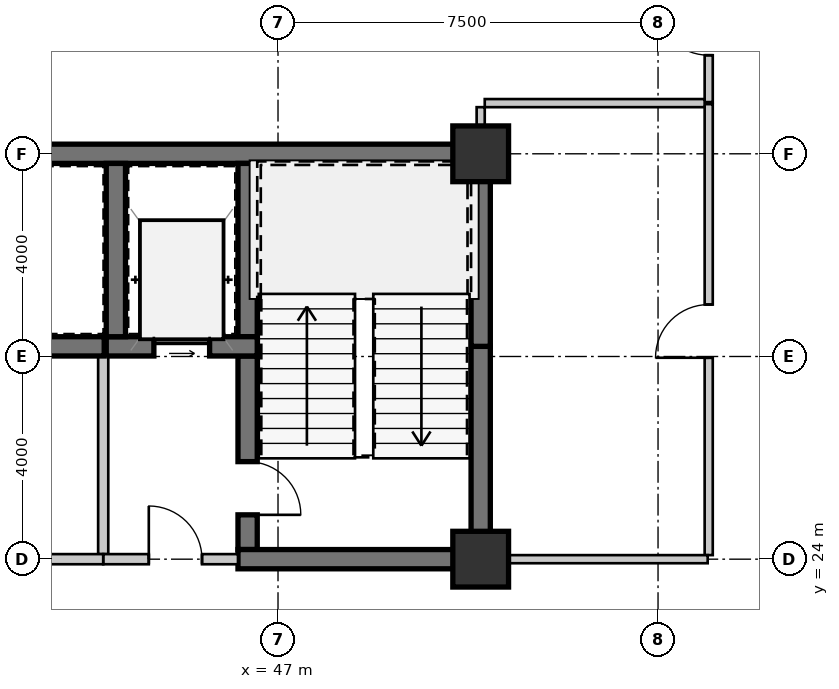
"""IFC4 building model, lengths in metres.
Left out: names, types, materials, properties, quantities, classifications, styles, units other than length and angle.
Written with IfcOpenShell. Run it as: python <this file> out.ifc"""

import sys

from ifc_helpers import new_model, si_unit, direction, frame, frame_2d, origin, origin_2d, place, context, subcontext, project, spatial, rectangle, extrude, source, transform, mapped, element, fill, save


model = new_model("IFC4")
c1 = context("Model", 3, precision=1e-05, world=origin(), true_north=direction((0.0, 1.0)))
c2 = subcontext(c1, "Body", "Model", "MODEL_VIEW")
j1 = project(units=[si_unit("LENGTHUNIT", "METRE"), si_unit("PLANEANGLEUNIT", "RADIAN")], contexts=[c1])
p1 = place(None, origin())
s1 = spatial("IfcSite", under=j1, at=p1, CompositionType="ELEMENT")
p2 = place(p1, origin())
s2 = spatial("IfcBuilding", under=s1, at=p2, CompositionType="ELEMENT")
p3 = place(p2, frame((0.0, 0.0, 4.55)))
s3 = spatial("IfcBuildingStorey", under=s2, at=p3, CompositionType="ELEMENT", Elevation=4.55)
m1 = source(origin(), c2, "Body", "SweptSolid", [
    extrude(rectangle(XDim=1.1, YDim=1.1, at=origin_2d()), origin(), (0.0, 0.0, 1.0), 3.85),
])
for number, where, z_axis, x_axis in (
    (1, (51.0, 24.0, 0.0), (0.0, 0.0, 1.0), (1.0, 0.0, 0.0)),
    (2, (51.0, 32.0, 0.0), (0.0, 0.0, 1.0), (1.0, 0.0, 0.0)),
):
    element("IfcColumn", number, at=place(p3, frame(where, z_axis=z_axis, x_axis=x_axis)), inside=s3, PredefinedType="COLUMN", context=c2, shape_type="MappedRepresentation", body=[
        mapped(m1, transform((0.0, 0.0, 0.0), scale=1.0)),
    ])
m2 = source(origin(), c2, "Body", "SweptSolid", [
    extrude(rectangle(XDim=11.99, YDim=0.38, at=frame_2d((5.995, 0.0))), origin(), (0.0, 0.0, 1.0), 3.59),
])
p4 = place(p3, frame((39.2, 32.0, 0.0), z_axis=(0.0, 0.0, 1.0), x_axis=(1.0, 0.0, 0.0)))
e3 = element("IfcWall", 3, at=p4, inside=s3, PredefinedType="SHEAR", context=c2, shape_type="MappedRepresentation", body=[
    mapped(m2, transform((0.0, 0.0, 0.0), scale=1.0)),
])
m3 = source(origin(), c2, "Body", "SweptSolid", [
    extrude(rectangle(XDim=4.01, YDim=0.38, at=frame_2d((2.005, 0.0))), origin(), (0.0, 0.0, 1.0), 3.59),
])
p5 = place(p3, frame((51.0, 24.19, 0.0), z_axis=(0.0, 0.0, 1.0), x_axis=(0.0, 1.0, 0.0)))
e4 = element("IfcWall", 4, at=p5, inside=s3, PredefinedType="SHEAR", context=c2, shape_type="MappedRepresentation", body=[
    mapped(m3, transform((0.0, 0.0, 0.0), scale=1.0)),
])
m4 = source(origin(), c2, "Body", "SweptSolid", [
    extrude(rectangle(XDim=3.61, YDim=0.38, at=frame_2d((1.805, 0.0))), origin(), (0.0, 0.0, 1.0), 3.59),
])
p6 = place(p3, frame((51.0, 28.2, 0.0), z_axis=(0.0, 0.0, 1.0), x_axis=(0.0, 1.0, 0.0)))
e5 = element("IfcWall", 5, at=p6, inside=s3, PredefinedType="SHEAR", context=c2, shape_type="MappedRepresentation", body=[
    mapped(m4, transform((0.0, 0.0, 0.0), scale=1.0)),
])
m5 = source(origin(), c2, "Body", "SweptSolid", [
    extrude(rectangle(XDim=3.42, YDim=0.38, at=frame_2d((1.71, 0.0))), origin(), (0.0, 0.0, 1.0), 3.59),
])
p7 = place(p3, frame((46.4, 31.81, 0.0), z_axis=(0.0, 0.0, 1.0), x_axis=(0.0, -1.0, 0.0)))
e6 = element("IfcWall", 6, at=p7, inside=s3, PredefinedType="SHEAR", context=c2, shape_type="MappedRepresentation", body=[
    mapped(m5, transform((0.0, 0.0, 0.0), scale=1.0)),
])
m6 = source(origin(), c2, "Body", "SweptSolid", [
    extrude(rectangle(XDim=3.82, YDim=0.38, at=frame_2d((1.91, 0.0))), origin(), (0.0, 0.0, 1.0), 3.59),
])
p8 = place(p3, frame((46.4, 28.01, 0.0), z_axis=(0.0, 0.0, 1.0), x_axis=(0.0, -1.0, 0.0)))
e7 = element("IfcWall", 7, at=p8, inside=s3, PredefinedType="SHEAR", context=c2, shape_type="MappedRepresentation", body=[
    mapped(m6, transform((0.0, 0.0, 0.0), scale=1.0)),
])
m7 = source(origin(), c2, "Body", "SweptSolid", [
    extrude(rectangle(XDim=1.05, YDim=2.1, at=frame_2d((0.525, 1.05))), frame((0.0, 0.2, 0.0), z_axis=(0.0, -1.0, 0.0), x_axis=(1.0, 0.0, 0.0)), (0.0, 0.0, 1.0), 0.4),
])
p9 = place(p8, frame((2.085, 0.0, 0.0)))
e8 = element("IfcOpeningElement", 8, at=p9, cuts=e7, PredefinedType="OPENING", context=c2, shape_type="MappedRepresentation", body=[
    mapped(m7, transform((0.0, 0.0, 0.0), scale=1.0)),
])
m8 = source(origin(), c2, "Body", "SweptSolid", [
    extrude(rectangle(XDim=4.98, YDim=0.38, at=frame_2d((2.49, 0.0))), origin(), (0.0, 0.0, 1.0), 3.59),
])
p10 = place(p3, frame((46.21, 24.0, 0.0), z_axis=(0.0, 0.0, 1.0), x_axis=(1.0, 0.0, 0.0)))
e9 = element("IfcWall", 9, at=p10, inside=s3, PredefinedType="SHEAR", context=c2, shape_type="MappedRepresentation", body=[
    mapped(m8, transform((0.0, 0.0, 0.0), scale=1.0)),
])
m9 = source(origin(), c2, "Body", "SweptSolid", [
    extrude(rectangle(XDim=2.98, YDim=0.38, at=frame_2d((1.49, 0.0))), origin(), (0.0, 0.0, 1.0), 3.59),
])
p11 = place(p3, frame((43.61, 28.2, 0.0), z_axis=(0.0, 0.0, 1.0), x_axis=(1.0, 0.0, 0.0)))
e10 = element("IfcWall", 10, at=p11, inside=s3, PredefinedType="SHEAR", context=c2, shape_type="MappedRepresentation", body=[
    mapped(m9, transform((0.0, 0.0, 0.0), scale=1.0)),
])
m10 = source(origin(), c2, "Body", "SweptSolid", [
    extrude(rectangle(XDim=1.1, YDim=2.15, at=frame_2d((0.55, 1.075))), frame((0.0, 0.2, 0.0), z_axis=(0.0, -1.0, 0.0), x_axis=(1.0, 0.0, 0.0)), (0.0, 0.0, 1.0), 0.4),
])
p12 = place(p11, frame((0.94, 0.0, 0.0)))
e11 = element("IfcOpeningElement", 11, at=p12, cuts=e10, PredefinedType="OPENING", context=c2, shape_type="MappedRepresentation", body=[
    mapped(m10, transform((0.0, 0.0, 0.0), scale=1.0)),
])
p13 = place(p3, frame((43.8, 31.81, 0.0), z_axis=(0.0, 0.0, 1.0), x_axis=(0.0, -1.0, 0.0)))
e12 = element("IfcWall", 12, at=p13, inside=s3, PredefinedType="SHEAR", context=c2, shape_type="MappedRepresentation", body=[
    mapped(m5, transform((0.0, 0.0, 0.0), scale=1.0)),
])
m11 = source(origin(), c2, "Body", "SweptSolid", [
    extrude(rectangle(XDim=3.91, YDim=0.2, at=frame_2d((1.955, 0.0))), origin(), (0.0, 0.0, 1.0), 3.59),
])
p14 = place(p3, frame((43.55, 28.01, 0.0), z_axis=(0.0, 0.0, 1.0), x_axis=(0.0, -1.0, 0.0)))
e13 = element("IfcWall", 13, at=p14, inside=s3, PredefinedType="SOLIDWALL", context=c2, shape_type="MappedRepresentation", body=[
    mapped(m11, transform((0.0, 0.0, 0.0), scale=1.0)),
])
m12 = source(origin(), c2, "Body", "SweptSolid", [
    extrude(rectangle(XDim=2.66, YDim=0.2, at=frame_2d((1.33, 0.0))), origin(), (0.0, 0.0, 1.0), 3.057),
])
p15 = place(p3, frame((43.55, 24.0, 0.0), z_axis=(0.0, 0.0, 1.0), x_axis=(1.0, 0.0, 0.0)))
e14 = element("IfcWall", 14, at=p15, inside=s3, PredefinedType="SOLIDWALL", context=c2, shape_type="MappedRepresentation", body=[
    mapped(m12, transform((0.0, 0.0, 0.0), scale=1.0)),
])
m13 = source(origin(), c2, "Body", "SweptSolid", [
    extrude(rectangle(XDim=1.05, YDim=2.1, at=frame_2d((0.525, 1.05))), frame((0.0, 0.11, 0.0), z_axis=(0.0, -1.0, 0.0), x_axis=(1.0, 0.0, 0.0)), (0.0, 0.0, 1.0), 0.22),
])
p16 = place(p15, frame((0.9, 0.0, 0.0)))
e15 = element("IfcOpeningElement", 15, at=p16, cuts=e14, PredefinedType="OPENING", context=c2, shape_type="MappedRepresentation", body=[
    mapped(m13, transform((0.0, 0.0, 0.0), scale=1.0)),
])
m14 = source(origin(), c2, "Body", "SweptSolid", [
    extrude(rectangle(XDim=1.44, YDim=0.38, at=frame_2d((0.72, 0.0))), origin(), (0.0, 0.0, 1.0), 3.59),
])
p17 = place(p3, frame((42.13, 28.2, 0.0), z_axis=(0.0, 0.0, 1.0), x_axis=(1.0, 0.0, 0.0)))
e16 = element("IfcWall", 16, at=p17, inside=s3, PredefinedType="SHEAR", context=c2, shape_type="MappedRepresentation", body=[
    mapped(m14, transform((0.0, 0.0, 0.0), scale=1.0)),
])
m15 = source(origin(), c2, "Body", "SweptSolid", [
    extrude(rectangle(XDim=4.35, YDim=0.2, at=frame_2d((2.175, 0.0))), origin(), (0.0, 0.0, 1.0), 3.057),
])
p18 = place(p3, frame((43.55, 24.0, 0.0), z_axis=(0.0, 0.0, 1.0), x_axis=(-1.0, 0.0, 0.0)))
e17 = element("IfcWall", 17, at=p18, inside=s3, PredefinedType="SOLIDWALL", context=c2, shape_type="MappedRepresentation", body=[
    mapped(m15, transform((0.0, 0.0, 0.0), scale=1.0)),
])
p19 = place(p18, frame((2.4, 0.0, 0.0)))
e18 = element("IfcOpeningElement", 18, at=p19, cuts=e17, PredefinedType="OPENING", context=c2, shape_type="MappedRepresentation", body=[
    mapped(m13, transform((0.0, 0.0, 0.0), scale=1.0)),
])
m16 = source(origin(), c2, "Body", "SweptSolid", [
    extrude(rectangle(XDim=8.9, YDim=0.16, at=frame_2d((4.45, 0.0))), origin(), (0.0, 0.0, 1.0), 3.59),
])
p20 = place(p3, frame((55.5, 24.08, 0.0), z_axis=(0.0, 0.0, 1.0), x_axis=(0.0, 1.0, 0.0)))
e19 = element("IfcWall", 19, at=p20, inside=s3, PredefinedType="PARTITIONING", context=c2, shape_type="MappedRepresentation", body=[
    mapped(m16, transform((0.0, 0.0, 0.0), scale=1.0)),
])
m17 = source(origin(), c2, "Body", "SweptSolid", [
    extrude(rectangle(XDim=1.05, YDim=2.1, at=frame_2d((0.525, 1.05))), frame((0.0, 0.09, 0.0), z_axis=(0.0, -1.0, 0.0), x_axis=(1.0, 0.0, 0.0)), (0.0, 0.0, 1.0), 0.18),
])
p21 = place(p20, frame((3.895, 0.0, 0.0)))
e20 = element("IfcOpeningElement", 20, at=p21, cuts=e19, PredefinedType="OPENING", context=c2, shape_type="MappedRepresentation", body=[
    mapped(m17, transform((0.0, 0.0, 0.0), scale=1.0)),
])
m18 = source(origin(), c2, "Body", "SweptSolid", [
    extrude(rectangle(XDim=4.29, YDim=0.16, at=frame_2d((2.145, 0.0))), origin(), (0.0, 0.0, 1.0), 3.59),
])
p22 = place(p3, frame((51.19, 24.0, 0.0), z_axis=(0.0, 0.0, 1.0), x_axis=(1.0, 0.0, 0.0)))
e21 = element("IfcWall", 21, at=p22, inside=s3, PredefinedType="PARTITIONING", context=c2, shape_type="MappedRepresentation", body=[
    mapped(m18, transform((0.0, 0.0, 0.0), scale=1.0)),
])
m19 = source(origin(), c2, "Body", "SweptSolid", [
    extrude(rectangle(XDim=2.9, YDim=0.16, at=frame_2d((1.45, 0.0))), origin(), (0.0, 0.0, 1.0), 3.59),
])
p23 = place(p3, frame((55.5, 33.02, 0.0), z_axis=(0.0, 0.0, 1.0), x_axis=(0.0, 1.0, 0.0)))
e22 = element("IfcWall", 22, at=p23, inside=s3, PredefinedType="PARTITIONING", context=c2, shape_type="MappedRepresentation", body=[
    mapped(m19, transform((0.0, 0.0, 0.0), scale=1.0)),
])
p24 = place(p23, frame((0.925, 0.0, 0.0)))
e23 = element("IfcOpeningElement", 23, at=p24, cuts=e22, PredefinedType="OPENING", context=c2, shape_type="MappedRepresentation", body=[
    mapped(m17, transform((0.0, 0.0, 0.0), scale=1.0)),
])
m20 = source(origin(), c2, "Body", "SweptSolid", [
    extrude(rectangle(XDim=4.34, YDim=0.16, at=frame_2d((2.17, 0.0))), origin(), (0.0, 0.0, 1.0), 3.59),
])
p25 = place(p3, frame((51.08, 33.0, 0.0), z_axis=(0.0, 0.0, 1.0), x_axis=(1.0, 0.0, 0.0)))
e24 = element("IfcWall", 24, at=p25, inside=s3, PredefinedType="PARTITIONING", context=c2, shape_type="MappedRepresentation", body=[
    mapped(m20, transform((0.0, 0.0, 0.0), scale=1.0)),
])
m21 = source(origin(), c2, "Body", "SweptSolid", [
    extrude(rectangle(XDim=0.73, YDim=0.16, at=frame_2d((0.365, 0.0))), origin(), (0.0, 0.0, 1.0), 3.59),
])
p26 = place(p3, frame((51.0, 32.19, 0.0), z_axis=(0.0, 0.0, 1.0), x_axis=(0.0, 1.0, 0.0)))
e25 = element("IfcWall", 25, at=p26, inside=s3, PredefinedType="PARTITIONING", context=c2, shape_type="MappedRepresentation", body=[
    mapped(m21, transform((0.0, 0.0, 0.0), scale=1.0)),
])
m22 = source(origin(), c2, "Body", "SweptSolid", [
    extrude(rectangle(XDim=1.05, YDim=2.1, at=frame_2d((0.525, 1.05))), frame((0.0, 0.025, 0.0), z_axis=(0.0, -1.0, 0.0), x_axis=(1.0, 0.0, 0.0)), (0.0, 0.0, 1.0), 0.05),
])
p27 = place(p9, origin())
e26 = element("IfcDoor", 26, at=p27, inside=s3, OperationType="SINGLE_SWING_RIGHT", PredefinedType="DOOR", context=c2, shape_type="MappedRepresentation", body=[
    mapped(m22, transform((0.0, 0.0, 0.0), scale=1.0)),
])
fill(e8, e26)
m23 = source(origin(), c2, "Body", "SweptSolid", [
    extrude(rectangle(XDim=1.1, YDim=2.15, at=frame_2d((0.55, 1.075))), frame((0.0, 0.025, 0.0), z_axis=(0.0, -1.0, 0.0), x_axis=(1.0, 0.0, 0.0)), (0.0, 0.0, 1.0), 0.05),
])
p28 = place(p12, origin())
e27 = element("IfcDoor", 27, at=p28, inside=s3, OperationType="SLIDING_TO_LEFT", PredefinedType="DOOR", context=c2, shape_type="MappedRepresentation", body=[
    mapped(m23, transform((0.0, 0.0, 0.0), scale=1.0)),
])
fill(e11, e27)
p29 = place(p16, origin())
e28 = element("IfcDoor", 28, at=p29, inside=s3, OperationType="SINGLE_SWING_LEFT", PredefinedType="DOOR", context=c2, shape_type="MappedRepresentation", body=[
    mapped(m22, transform((0.0, 0.0, 0.0), scale=1.0)),
])
fill(e15, e28)
p30 = place(p21, origin())
e29 = element("IfcDoor", 29, at=p30, inside=s3, OperationType="SINGLE_SWING_LEFT", PredefinedType="DOOR", context=c2, shape_type="MappedRepresentation", body=[
    mapped(m22, transform((0.0, 0.0, 0.0), scale=1.0)),
])
fill(e20, e29)
p31 = place(p24, origin())
e30 = element("IfcDoor", 30, at=p31, inside=s3, OperationType="SINGLE_SWING_RIGHT", PredefinedType="DOOR", context=c2, shape_type="MappedRepresentation", body=[
    mapped(m22, transform((0.0, 0.0, 0.0), scale=1.0)),
])
fill(e23, e30)
save(model, sys.argv[1])
